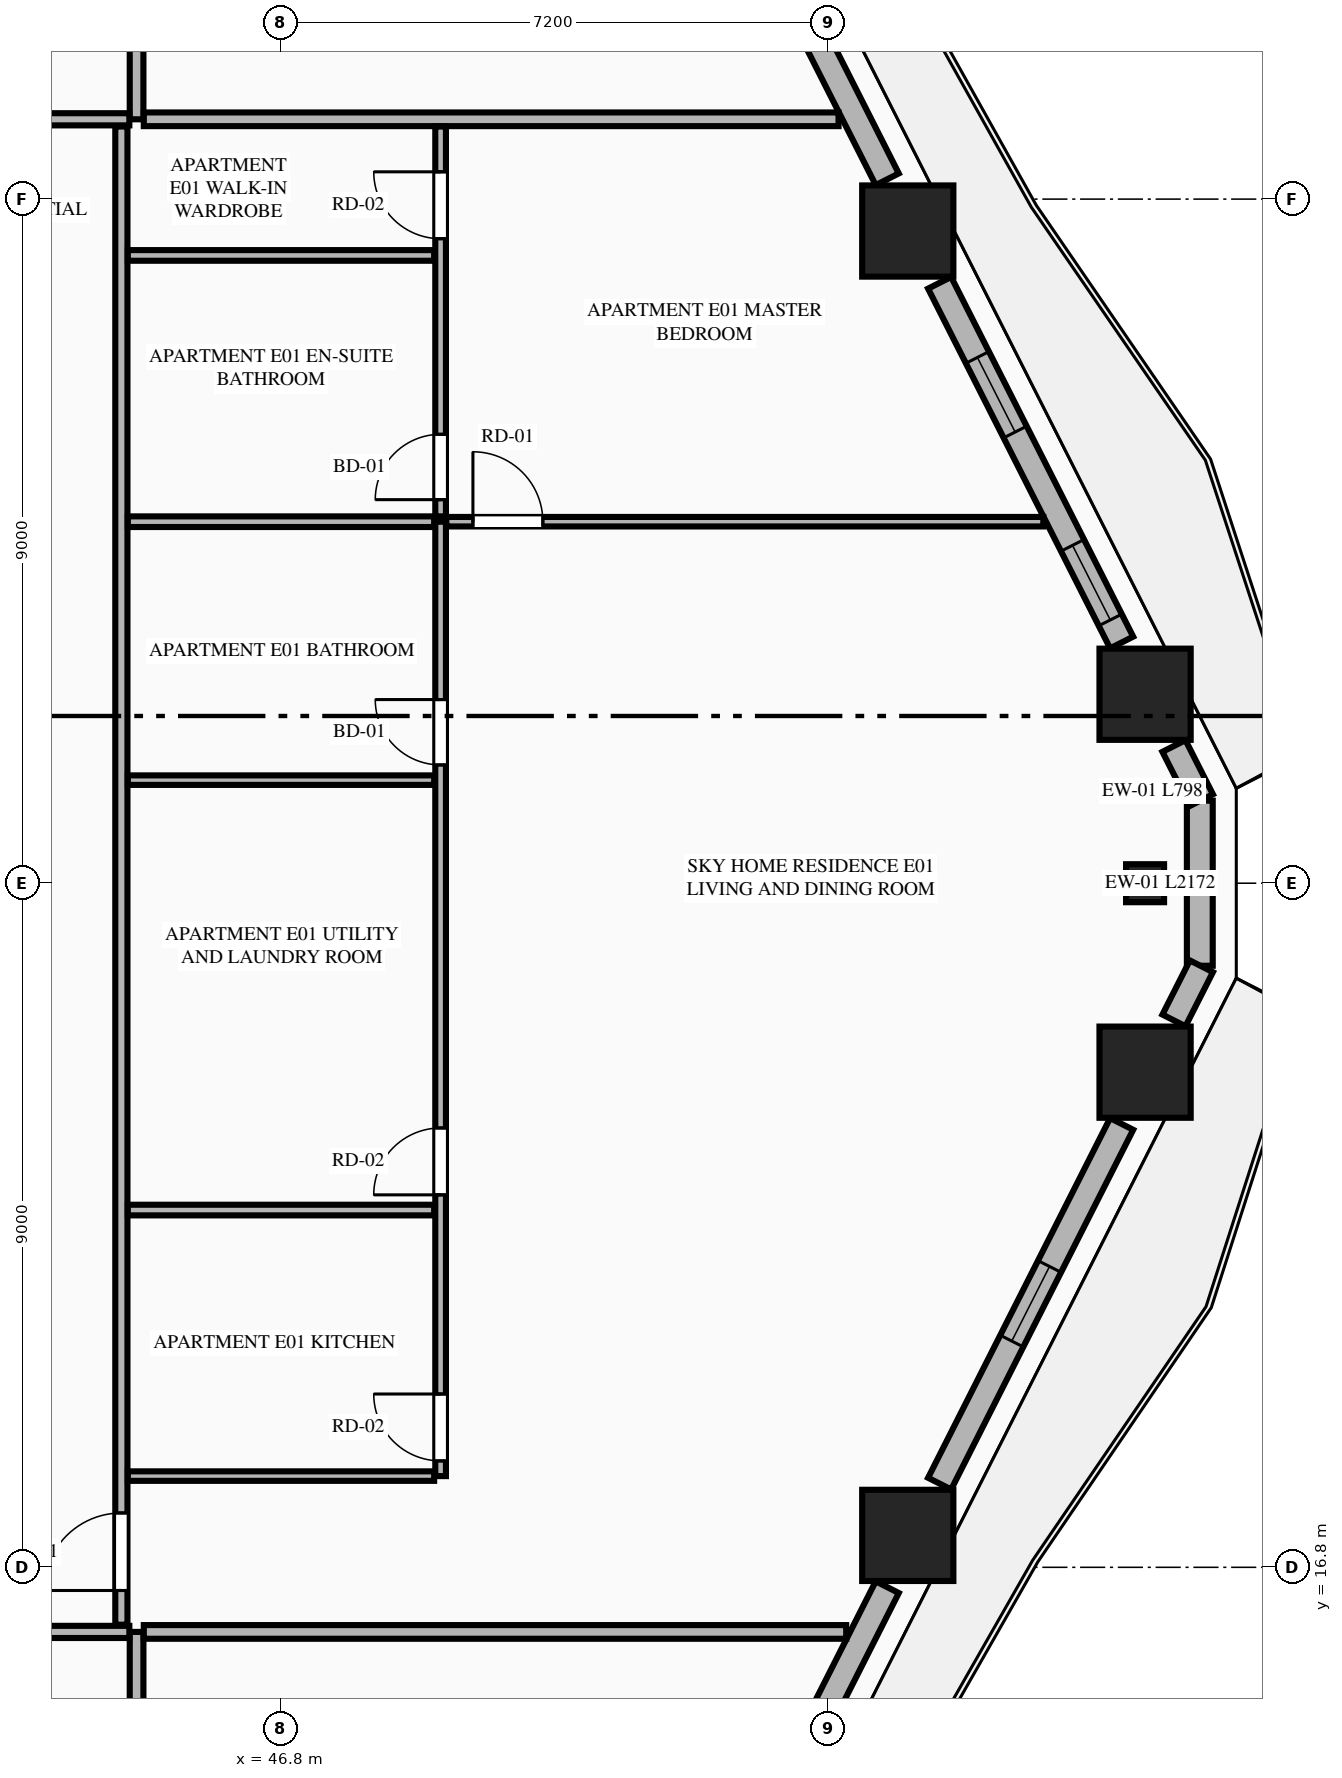
"""IFC4 building model, lengths in metres.
Left out: names, types, materials, properties, quantities, classifications, styles, units other than length and angle.
Written with IfcOpenShell. Run it as: python <this file> out.ifc"""

import sys

from ifc_helpers import new_model, si_unit, direction, frame, frame_2d, origin, origin_2d, place, context, subcontext, project, spatial, rectangle, extrude, element, fill, save


model = new_model("IFC4")
c1 = context("Model", 3, precision=1e-05, world=origin(), true_north=direction((0.0, 1.0)))
c2 = subcontext(c1, "Body", "Model", "MODEL_VIEW")
j1 = project(units=[si_unit("LENGTHUNIT", "METRE"), si_unit("PLANEANGLEUNIT", "RADIAN")], contexts=[c1])
p1 = place(None, origin())
s1 = spatial("IfcSite", under=j1, at=p1, CompositionType="ELEMENT")
p2 = place(p1, origin())
s2 = spatial("IfcBuilding", under=s1, at=p2, CompositionType="ELEMENT")
p3 = place(p2, frame((0.0, 0.0, 60.4)))
s3 = spatial("IfcBuildingStorey", under=s2, at=p3, CompositionType="ELEMENT", Elevation=60.4)
for number, where, z_axis, x_axis in (
    (1, (55.046, 17.22, 0.0), (0.0, 0.0, 1.0), (1.0, 0.0, 0.0)),
    (2, (58.168, 23.314, 0.0), (0.0, 0.0, 1.0), (1.0, 0.0, 0.0)),
    (3, (58.168, 28.286, 0.0), (0.0, 0.0, 1.0), (1.0, 0.0, 0.0)),
    (4, (55.046, 34.38, 0.0), (0.0, 0.0, 1.0), (1.0, 0.0, 0.0)),
):
    element("IfcColumn", number, at=place(p3, frame(where, z_axis=z_axis, x_axis=x_axis)), inside=s3, PredefinedType="COLUMN", context=c2, shape_type="SweptSolid", body=[
        extrude(rectangle(XDim=1.2, YDim=1.2, at=origin_2d()), origin(), (0.0, 0.0, 1.0), 3.55),
    ])
p4 = place(p3, frame((58.168, 25.8, 0.0), z_axis=(0.0, 0.0, 1.0), x_axis=(0.0, 1.0, 0.0)))
e5 = element("IfcColumn", 5, at=p4, inside=s3, PredefinedType="PILASTER", context=c2, shape_type="SweptSolid", body=[
    extrude(rectangle(XDim=0.5, YDim=0.35, at=origin_2d()), origin(), (0.0, 0.0, 1.0), 3.55),
])
p5 = place(p3, frame((58.888, 24.714, 0.0), z_axis=(0.0, 0.0, 1.0), x_axis=(0.0, 1.0, 0.0)))
e6 = element("IfcWall", 6, at=p5, inside=s3, PredefinedType="STANDARD", context=c2, shape_type="SweptSolid", body=[
    extrude(rectangle(XDim=2.172, YDim=0.34, at=frame_2d((1.086, 0.0))), origin(), (0.0, 0.0, 1.0), 3.33),
])
p6 = place(p3, frame((52.271, 11.59, 0.0), z_axis=(0.0, 0.0, 1.0), x_axis=(0.451592100298, 0.892224509273, 0.0)))
e7 = element("IfcWall", 7, at=p6, inside=s3, PredefinedType="STANDARD", context=c2, shape_type="SweptSolid", body=[
    extrude(rectangle(XDim=5.547, YDim=0.34, at=frame_2d((2.773, 0.0))), origin(), (0.0, 0.0, 1.0), 2.787),
])
p7 = place(p6, frame((1.768, 0.0, 0.0)))
e8 = element("IfcOpeningElement", 8, at=p7, cuts=e7, PredefinedType="OPENING", context=c2, shape_type="SweptSolid", body=[
    extrude(rectangle(XDim=1.1, YDim=2.25, at=frame_2d((0.55, 1.125))), frame((0.0, 0.18, 0.0), z_axis=(0.0, -1.0, 0.0), x_axis=(1.0, 0.0, 0.0)), (0.0, 0.0, 1.0), 0.36),
])
p8 = place(p3, frame((55.465, 17.901, 0.0), z_axis=(0.0, 0.0, 1.0), x_axis=(0.451572088722, 0.892234637686, 0.0)))
e9 = element("IfcWall", 9, at=p8, inside=s3, PredefinedType="STANDARD", context=c2, shape_type="SweptSolid", body=[
    extrude(rectangle(XDim=5.304, YDim=0.34, at=frame_2d((2.652, 0.0))), origin(), (0.0, 0.0, 1.0), 2.787),
])
p9 = place(p8, frame((2.102, 0.0, 0.75)))
e10 = element("IfcOpeningElement", 10, at=p9, cuts=e9, PredefinedType="OPENING", context=c2, shape_type="SweptSolid", body=[
    extrude(rectangle(XDim=1.1, YDim=1.887, at=frame_2d((0.55, 0.943))), frame((0.0, 0.18, 0.0), z_axis=(0.0, -1.0, 0.0), x_axis=(1.0, 0.0, 0.0)), (0.0, 0.0, 1.0), 0.36),
])
for number, where, z_axis, x_axis in (
    (11, (58.548, 23.995, 0.0), (0.0, 0.0, 1.0), (0.452, 0.892, 0.0)),
    (12, (58.909, 26.893, 0.0), (0.0, 0.0, 1.0), (-0.452, 0.892, 0.0)),
):
    element("IfcWall", number, at=place(p3, frame(where, z_axis=z_axis, x_axis=x_axis)), inside=s3, PredefinedType="STANDARD", context=c2, shape_type="SweptSolid", body=[
        extrude(rectangle(XDim=0.798, YDim=0.34, at=frame_2d((0.399, 0.0))), origin(), (0.0, 0.0, 1.0), 3.33),
    ])
p10 = place(p3, frame((57.86, 28.967, 0.0), z_axis=(0.0, 0.0, 1.0), x_axis=(-0.451590635984, 0.892225250422, 0.0)))
e13 = element("IfcWall", 13, at=p10, inside=s3, PredefinedType="STANDARD", context=c2, shape_type="SweptSolid", body=[
    extrude(rectangle(XDim=5.303, YDim=0.34, at=frame_2d((2.652, 0.0))), origin(), (0.0, 0.0, 1.0), 2.787),
])
p11 = place(p10, frame((0.332, 0.0, 0.75)))
e14 = element("IfcOpeningElement", 14, at=p11, cuts=e13, PredefinedType="OPENING", context=c2, shape_type="SweptSolid", body=[
    extrude(rectangle(XDim=1.1, YDim=1.887, at=frame_2d((0.55, 0.943))), frame((0.0, 0.18, 0.0), z_axis=(0.0, -1.0, 0.0), x_axis=(1.0, 0.0, 0.0)), (0.0, 0.0, 1.0), 0.36),
])
p12 = place(p10, frame((3.103, 0.0, 0.75)))
e15 = element("IfcOpeningElement", 15, at=p12, cuts=e13, PredefinedType="OPENING", context=c2, shape_type="SweptSolid", body=[
    extrude(rectangle(XDim=1.1, YDim=1.887, at=frame_2d((0.55, 0.943))), frame((0.0, 0.18, 0.0), z_axis=(0.0, -1.0, 0.0), x_axis=(1.0, 0.0, 0.0)), (0.0, 0.0, 1.0), 0.36),
])
p13 = place(p3, frame((54.776, 35.061, 0.0), z_axis=(0.0, 0.0, 1.0), x_axis=(-0.451592100298, 0.892224509273, 0.0)))
e16 = element("IfcWall", 16, at=p13, inside=s3, PredefinedType="STANDARD", context=c2, shape_type="SweptSolid", body=[
    extrude(rectangle(XDim=5.547, YDim=0.34, at=frame_2d((2.773, 0.0))), origin(), (0.0, 0.0, 1.0), 2.787),
])
p14 = place(p13, frame((2.791, 0.0, 0.0)))
e17 = element("IfcOpeningElement", 17, at=p14, cuts=e16, PredefinedType="OPENING", context=c2, shape_type="SweptSolid", body=[
    extrude(rectangle(XDim=1.1, YDim=2.25, at=frame_2d((0.55, 1.125))), frame((0.0, 0.18, 0.0), z_axis=(0.0, -1.0, 0.0), x_axis=(1.0, 0.0, 0.0)), (0.0, 0.0, 1.0), 0.36),
])
p15 = place(p3, frame((44.9, 2.455, 0.0), z_axis=(0.0, 0.0, 1.0), x_axis=(0.0, 1.0, 0.0)))
e18 = element("IfcWall", 18, at=p15, inside=s3, PredefinedType="PARTITIONING", context=c2, shape_type="SweptSolid", body=[
    extrude(rectangle(XDim=13.495, YDim=0.18, at=frame_2d((6.748, 0.0))), origin(), (0.0, 0.0, 1.0), 3.33),
])
p16 = place(p3, frame((36.617, 15.95, 0.0), z_axis=(0.0, 0.0, 1.0), x_axis=(1.0, 0.0, 0.0)))
e19 = element("IfcWall", 19, at=p16, inside=s3, PredefinedType="PARTITIONING", context=c2, shape_type="SweptSolid", body=[
    extrude(rectangle(XDim=8.188, YDim=0.16, at=frame_2d((4.094, 0.0))), origin(), (0.0, 0.0, 1.0), 3.33),
])
p17 = place(p16, frame((0.355, 0.0, 0.0)))
e20 = element("IfcOpeningElement", 20, at=p17, cuts=e19, PredefinedType="OPENING", context=c2, shape_type="SweptSolid", body=[
    extrude(rectangle(XDim=1.02, YDim=2.25, at=frame_2d((0.51, 1.125))), frame((0.0, 0.09, 0.0), z_axis=(0.0, -1.0, 0.0), x_axis=(1.0, 0.0, 0.0)), (0.0, 0.0, 1.0), 0.18),
])
p18 = place(p3, frame((44.9, 35.85, 0.0), z_axis=(0.0, 0.0, 1.0), x_axis=(0.0, 1.0, 0.0)))
e21 = element("IfcWall", 21, at=p18, inside=s3, PredefinedType="PARTITIONING", context=c2, shape_type="SweptSolid", body=[
    extrude(rectangle(XDim=13.295, YDim=0.18, at=frame_2d((6.647, 0.0))), origin(), (0.0, 0.0, 1.0), 3.33),
])
p19 = place(p3, frame((28.373, 35.85, 0.0), z_axis=(0.0, 0.0, 1.0), x_axis=(1.0, 0.0, 0.0)))
e22 = element("IfcWall", 22, at=p19, inside=s3, PredefinedType="PARTITIONING", context=c2, shape_type="SweptSolid", body=[
    extrude(rectangle(XDim=16.432, YDim=0.16, at=frame_2d((8.216, 0.0))), origin(), (0.0, 0.0, 1.0), 3.33),
])
p20 = place(p19, frame((0.355, 0.0, 0.0)))
e23 = element("IfcOpeningElement", 23, at=p20, cuts=e22, PredefinedType="OPENING", context=c2, shape_type="SweptSolid", body=[
    extrude(rectangle(XDim=1.35, YDim=2.35, at=frame_2d((0.675, 1.175))), frame((0.0, 0.09, 0.0), z_axis=(0.0, -1.0, 0.0), x_axis=(1.0, 0.0, 0.0)), (0.0, 0.0, 1.0), 0.18),
])
p21 = place(p3, frame((44.995, 15.95, 0.0), z_axis=(0.0, 0.0, 1.0), x_axis=(1.0, 0.0, 0.0)))
e24 = element("IfcWall", 24, at=p21, inside=s3, PredefinedType="PARTITIONING", context=c2, shape_type="SweptSolid", body=[
    extrude(rectangle(XDim=9.241, YDim=0.18, at=frame_2d((4.621, 0.0))), origin(), (0.0, 0.0, 1.0), 3.33),
])
p22 = place(p3, frame((44.995, 35.85, 0.0), z_axis=(0.0, 0.0, 1.0), x_axis=(1.0, 0.0, 0.0)))
e25 = element("IfcWall", 25, at=p22, inside=s3, PredefinedType="PARTITIONING", context=c2, shape_type="SweptSolid", body=[
    extrude(rectangle(XDim=9.14, YDim=0.18, at=frame_2d((4.57, 0.0))), origin(), (0.0, 0.0, 1.0), 3.33),
])
p23 = place(p3, frame((44.7, 16.045, 0.0), z_axis=(0.0, 0.0, 1.0), x_axis=(0.0, 1.0, 0.0)))
e26 = element("IfcWall", 26, at=p23, inside=s3, PredefinedType="PARTITIONING", context=c2, shape_type="SweptSolid", body=[
    extrude(rectangle(XDim=19.71, YDim=0.16, at=frame_2d((9.855, 0.0))), origin(), (0.0, 0.0, 1.0), 3.33),
])
p24 = place(p23, frame((0.45, 0.0, 0.0)))
e27 = element("IfcOpeningElement", 27, at=p24, cuts=e26, PredefinedType="OPENING", context=c2, shape_type="SweptSolid", body=[
    extrude(rectangle(XDim=1.02, YDim=2.25, at=frame_2d((0.51, 1.125))), frame((0.0, 0.09, 0.0), z_axis=(0.0, -1.0, 0.0), x_axis=(1.0, 0.0, 0.0)), (0.0, 0.0, 1.0), 0.18),
])
p25 = place(p3, frame((44.785, 18.0, 0.0), z_axis=(0.0, 0.0, 1.0), x_axis=(1.0, 0.0, 0.0)))
e28 = element("IfcWall", 28, at=p25, inside=s3, PredefinedType="PARTITIONING", context=c2, shape_type="SweptSolid", body=[
    extrude(rectangle(XDim=4.03, YDim=0.125, at=frame_2d((2.015, 0.0))), origin(), (0.0, 0.0, 1.0), 2.636),
])
p26 = place(p3, frame((48.9, 18.0, 0.0), z_axis=(0.0, 0.0, 1.0), x_axis=(0.0, 1.0, 0.0)))
e29 = element("IfcWall", 29, at=p26, inside=s3, PredefinedType="PLUMBINGWALL", context=c2, shape_type="SweptSolid", body=[
    extrude(rectangle(XDim=12.556, YDim=0.14, at=frame_2d((6.278, 0.0))), origin(), (0.0, 0.0, 1.0), 3.33),
])
p27 = place(p26, frame((0.2, 0.0, 0.0)))
e30 = element("IfcOpeningElement", 30, at=p27, cuts=e29, PredefinedType="OPENING", context=c2, shape_type="SweptSolid", body=[
    extrude(rectangle(XDim=0.88, YDim=2.15, at=frame_2d((0.44, 1.075))), frame((0.0, 0.08, 0.0), z_axis=(0.0, -1.0, 0.0), x_axis=(1.0, 0.0, 0.0)), (0.0, 0.0, 1.0), 0.16),
])
p28 = place(p26, frame((3.7, 0.0, 0.0)))
e31 = element("IfcOpeningElement", 31, at=p28, cuts=e29, PredefinedType="OPENING", context=c2, shape_type="SweptSolid", body=[
    extrude(rectangle(XDim=0.88, YDim=2.15, at=frame_2d((0.44, 1.075))), frame((0.0, 0.08, 0.0), z_axis=(0.0, -1.0, 0.0), x_axis=(1.0, 0.0, 0.0)), (0.0, 0.0, 1.0), 0.16),
])
p29 = place(p26, frame((9.356, 0.0, 0.0)))
e32 = element("IfcOpeningElement", 32, at=p29, cuts=e29, PredefinedType="OPENING", context=c2, shape_type="SweptSolid", body=[
    extrude(rectangle(XDim=0.86, YDim=2.1, at=frame_2d((0.43, 1.05))), frame((0.0, 0.08, 0.0), z_axis=(0.0, -1.0, 0.0), x_axis=(1.0, 0.0, 0.0)), (0.0, 0.0, 1.0), 0.16),
])
p30 = place(p3, frame((48.9, 30.626, 0.0), z_axis=(0.0, 0.0, 1.0), x_axis=(0.0, 1.0, 0.0)))
e33 = element("IfcWall", 33, at=p30, inside=s3, PredefinedType="PLUMBINGWALL", context=c2, shape_type="SweptSolid", body=[
    extrude(rectangle(XDim=5.129, YDim=0.14, at=frame_2d((2.564, 0.0))), origin(), (0.0, 0.0, 1.0), 3.33),
])
p31 = place(p30, frame((0.22, 0.0, 0.0)))
e34 = element("IfcOpeningElement", 34, at=p31, cuts=e33, PredefinedType="OPENING", context=c2, shape_type="SweptSolid", body=[
    extrude(rectangle(XDim=0.86, YDim=2.1, at=frame_2d((0.43, 1.05))), frame((0.0, 0.08, 0.0), z_axis=(0.0, -1.0, 0.0), x_axis=(1.0, 0.0, 0.0)), (0.0, 0.0, 1.0), 0.16),
])
p32 = place(p30, frame((3.653, 0.0, 0.0)))
e35 = element("IfcOpeningElement", 35, at=p32, cuts=e33, PredefinedType="OPENING", context=c2, shape_type="SweptSolid", body=[
    extrude(rectangle(XDim=0.88, YDim=2.15, at=frame_2d((0.44, 1.075))), frame((0.0, 0.08, 0.0), z_axis=(0.0, -1.0, 0.0), x_axis=(1.0, 0.0, 0.0)), (0.0, 0.0, 1.0), 0.16),
])
p33 = place(p3, frame((44.785, 30.556, 0.0), z_axis=(0.0, 0.0, 1.0), x_axis=(1.0, 0.0, 0.0)))
e36 = element("IfcWall", 36, at=p33, inside=s3, PredefinedType="PLUMBINGWALL", context=c2, shape_type="SweptSolid", body=[
    extrude(rectangle(XDim=4.03, YDim=0.14, at=frame_2d((2.015, 0.0))), origin(), (0.0, 0.0, 1.0), 3.33),
])
p34 = place(p3, frame((48.975, 30.556, 0.0), z_axis=(0.0, 0.0, 1.0), x_axis=(1.0, 0.0, 0.0)))
e37 = element("IfcWall", 37, at=p34, inside=s3, PredefinedType="PARTITIONING", context=c2, shape_type="SweptSolid", body=[
    extrude(rectangle(XDim=7.854, YDim=0.125, at=frame_2d((3.927, 0.0))), origin(), (0.0, 0.0, 1.0), 3.33),
])
p35 = place(p34, frame((0.35, 0.0, 0.0)))
e38 = element("IfcOpeningElement", 38, at=p35, cuts=e37, PredefinedType="OPENING", context=c2, shape_type="SweptSolid", body=[
    extrude(rectangle(XDim=0.92, YDim=2.15, at=frame_2d((0.46, 1.075))), frame((0.0, 0.073, 0.0), z_axis=(0.0, -1.0, 0.0), x_axis=(1.0, 0.0, 0.0)), (0.0, 0.0, 1.0), 0.145),
])
p36 = place(p3, frame((44.785, 21.5, 0.0), z_axis=(0.0, 0.0, 1.0), x_axis=(1.0, 0.0, 0.0)))
e39 = element("IfcWall", 39, at=p36, inside=s3, PredefinedType="PLUMBINGWALL", context=c2, shape_type="SweptSolid", body=[
    extrude(rectangle(XDim=4.03, YDim=0.14, at=frame_2d((2.015, 0.0))), origin(), (0.0, 0.0, 1.0), 3.33),
])
p37 = place(p3, frame((44.785, 27.156, 0.0), z_axis=(0.0, 0.0, 1.0), x_axis=(1.0, 0.0, 0.0)))
e40 = element("IfcWall", 40, at=p37, inside=s3, PredefinedType="PARTITIONING", context=c2, shape_type="SweptSolid", body=[
    extrude(rectangle(XDim=4.03, YDim=0.125, at=frame_2d((2.015, 0.0))), origin(), (0.0, 0.0, 1.0), 3.33),
])
p38 = place(p3, frame((44.785, 34.059, 0.0), z_axis=(0.0, 0.0, 1.0), x_axis=(1.0, 0.0, 0.0)))
e41 = element("IfcWall", 41, at=p38, inside=s3, PredefinedType="PLUMBINGWALL", context=c2, shape_type="SweptSolid", body=[
    extrude(rectangle(XDim=4.03, YDim=0.14, at=frame_2d((2.015, 0.0))), origin(), (0.0, 0.0, 1.0), 2.636),
])
p39 = place(p9, origin())
e42 = element("IfcWindow", 42, at=p39, inside=s3, PartitioningType="SINGLE_PANEL", PredefinedType="WINDOW", context=c2, shape_type="SweptSolid", body=[
    extrude(rectangle(XDim=1.1, YDim=1.887, at=frame_2d((0.55, 0.943))), frame((0.0, 0.03, 0.0), z_axis=(0.0, -1.0, 0.0), x_axis=(1.0, 0.0, 0.0)), (0.0, 0.0, 1.0), 0.06),
])
fill(e10, e42)
p40 = place(p11, origin())
e43 = element("IfcWindow", 43, at=p40, inside=s3, PartitioningType="SINGLE_PANEL", PredefinedType="WINDOW", context=c2, shape_type="SweptSolid", body=[
    extrude(rectangle(XDim=1.1, YDim=1.887, at=frame_2d((0.55, 0.943))), frame((0.0, 0.03, 0.0), z_axis=(0.0, -1.0, 0.0), x_axis=(1.0, 0.0, 0.0)), (0.0, 0.0, 1.0), 0.06),
])
fill(e14, e43)
p41 = place(p27, origin())
e44 = element("IfcDoor", 44, at=p41, inside=s3, OperationType="SINGLE_SWING_RIGHT", PredefinedType="DOOR", context=c2, shape_type="SweptSolid", body=[
    extrude(rectangle(XDim=0.88, YDim=2.15, at=frame_2d((0.44, 1.075))), frame((0.0, 0.025, 0.0), z_axis=(0.0, -1.0, 0.0), x_axis=(1.0, 0.0, 0.0)), (0.0, 0.0, 1.0), 0.05),
])
fill(e30, e44)
p42 = place(p28, origin())
e45 = element("IfcDoor", 45, at=p42, inside=s3, OperationType="SINGLE_SWING_LEFT", PredefinedType="DOOR", context=c2, shape_type="SweptSolid", body=[
    extrude(rectangle(XDim=0.88, YDim=2.15, at=frame_2d((0.44, 1.075))), frame((0.0, 0.025, 0.0), z_axis=(0.0, -1.0, 0.0), x_axis=(1.0, 0.0, 0.0)), (0.0, 0.0, 1.0), 0.05),
])
fill(e31, e45)
p43 = place(p29, origin())
e46 = element("IfcDoor", 46, at=p43, inside=s3, OperationType="SINGLE_SWING_RIGHT", PredefinedType="DOOR", context=c2, shape_type="SweptSolid", body=[
    extrude(rectangle(XDim=0.86, YDim=2.1, at=frame_2d((0.43, 1.05))), frame((0.0, 0.025, 0.0), z_axis=(0.0, -1.0, 0.0), x_axis=(1.0, 0.0, 0.0)), (0.0, 0.0, 1.0), 0.05),
])
fill(e32, e46)
p44 = place(p31, origin())
e47 = element("IfcDoor", 47, at=p44, inside=s3, OperationType="SINGLE_SWING_LEFT", PredefinedType="DOOR", context=c2, shape_type="SweptSolid", body=[
    extrude(rectangle(XDim=0.86, YDim=2.1, at=frame_2d((0.43, 1.05))), frame((0.0, 0.025, 0.0), z_axis=(0.0, -1.0, 0.0), x_axis=(1.0, 0.0, 0.0)), (0.0, 0.0, 1.0), 0.05),
])
fill(e34, e47)
p45 = place(p32, origin())
e48 = element("IfcDoor", 48, at=p45, inside=s3, OperationType="SINGLE_SWING_RIGHT", PredefinedType="DOOR", context=c2, shape_type="SweptSolid", body=[
    extrude(rectangle(XDim=0.88, YDim=2.15, at=frame_2d((0.44, 1.075))), frame((0.0, 0.025, 0.0), z_axis=(0.0, -1.0, 0.0), x_axis=(1.0, 0.0, 0.0)), (0.0, 0.0, 1.0), 0.05),
])
fill(e35, e48)
p46 = place(p24, origin())
e49 = element("IfcDoor", 49, at=p46, inside=s3, OperationType="SINGLE_SWING_LEFT", PredefinedType="DOOR", context=c2, shape_type="SweptSolid", body=[
    extrude(rectangle(XDim=1.02, YDim=2.25, at=frame_2d((0.51, 1.125))), frame((0.0, 0.025, 0.0), z_axis=(0.0, -1.0, 0.0), x_axis=(1.0, 0.0, 0.0)), (0.0, 0.0, 1.0), 0.05),
])
fill(e27, e49)
p47 = place(p35, origin())
e50 = element("IfcDoor", 50, at=p47, inside=s3, OperationType="SINGLE_SWING_LEFT", PredefinedType="DOOR", context=c2, shape_type="SweptSolid", body=[
    extrude(rectangle(XDim=0.92, YDim=2.15, at=frame_2d((0.46, 1.075))), frame((0.0, 0.025, 0.0), z_axis=(0.0, -1.0, 0.0), x_axis=(1.0, 0.0, 0.0)), (0.0, 0.0, 1.0), 0.05),
])
fill(e38, e50)
p48 = place(p12, origin())
e51 = element("IfcWindow", 51, at=p48, inside=s3, PartitioningType="SINGLE_PANEL", PredefinedType="WINDOW", context=c2, shape_type="SweptSolid", body=[
    extrude(rectangle(XDim=1.1, YDim=1.887, at=frame_2d((0.55, 0.943))), frame((0.0, 0.03, 0.0), z_axis=(0.0, -1.0, 0.0), x_axis=(1.0, 0.0, 0.0)), (0.0, 0.0, 1.0), 0.06),
])
fill(e15, e51)
save(model, sys.argv[1])
